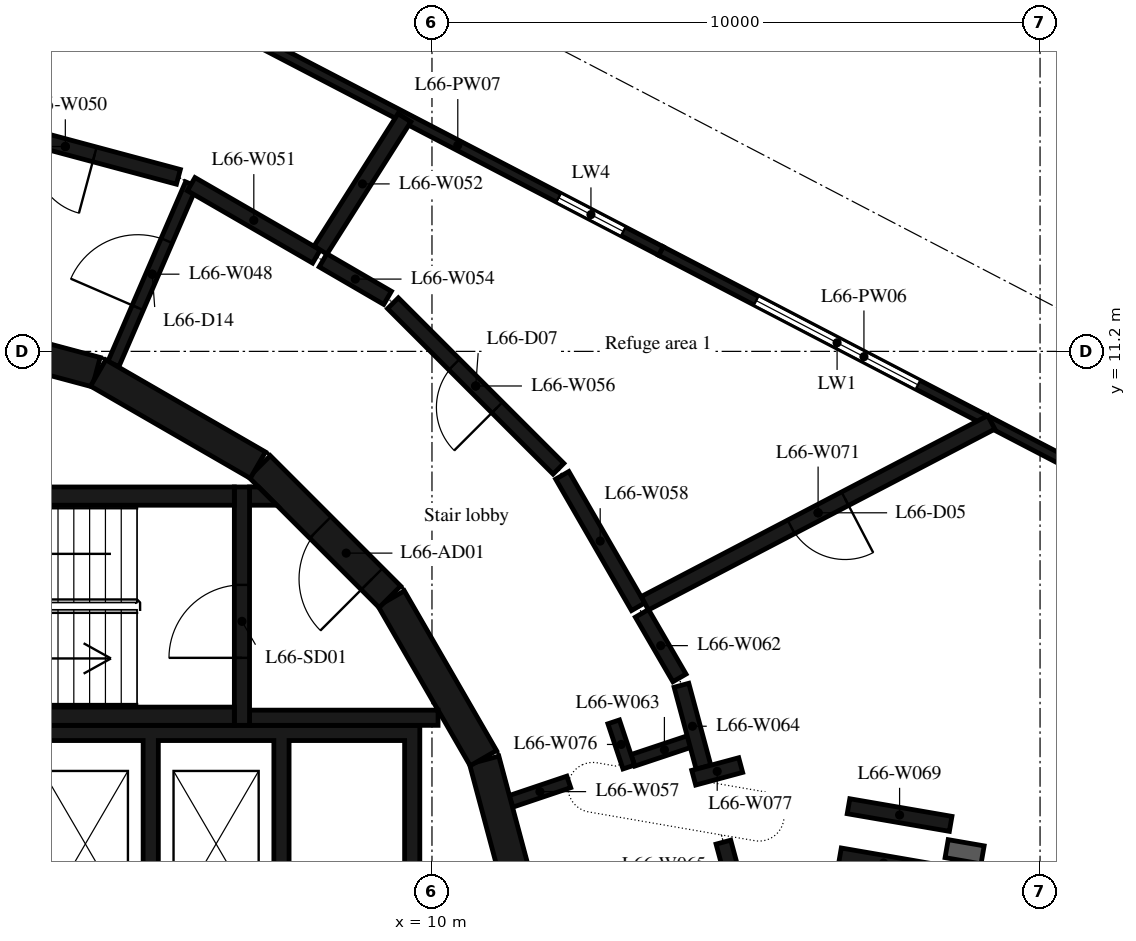
"""IFC4 building model, lengths in metres.
Left out: names, types, materials, properties, quantities, classifications, styles, units other than length and angle.
Written with IfcOpenShell. Run it as: python <this file> out.ifc"""

import sys

from ifc_helpers import new_model, si_unit, direction, frame, frame_2d, origin, place, context, subcontext, project, spatial, polyline, rectangle, outline, extrude, element, fill, save


model = new_model("IFC4")
c1 = context("Model", 3, precision=1e-05, world=origin(), true_north=direction((0.0, 1.0)))
c2 = subcontext(c1, "Body", "Model", "MODEL_VIEW")
j1 = project(units=[si_unit("LENGTHUNIT", "METRE"), si_unit("PLANEANGLEUNIT", "RADIAN")], contexts=[c1])
p1 = place(None, origin())
s1 = spatial("IfcSite", under=j1, at=p1, CompositionType="ELEMENT")
p2 = place(p1, origin())
s2 = spatial("IfcBuilding", under=s1, at=p2, CompositionType="ELEMENT")
p3 = place(p2, frame((0.0, 0.0, 258.2)))
s3 = spatial("IfcBuildingStorey", under=s2, at=p3, CompositionType="ELEMENT", Elevation=258.2)
p4 = place(p3, frame((20.443, 9.374, 0.0), z_axis=(0.0, 0.0, 1.0), x_axis=(-0.88700649569, 0.461756945377, 0.0)))
e1 = element("IfcWall", 1, at=p4, inside=s3, PredefinedType="STANDARD", context=c2, shape_type="SweptSolid", body=[
    extrude(rectangle(XDim=7.53, YDim=0.16, at=frame_2d((3.765, 0.0))), origin(), (0.0, 0.0, 1.0), 4.75),
])
p5 = place(p4, frame((2.763, 0.0, 1.0)))
e2 = element("IfcOpeningElement", 2, at=p5, cuts=e1, PredefinedType="OPENING", context=c2, shape_type="SweptSolid", body=[
    extrude(rectangle(XDim=3.0, YDim=2.2, at=frame_2d((1.5, 1.1))), frame((0.0, 0.09, 0.0), z_axis=(0.0, -1.0, 0.0), x_axis=(1.0, 0.0, 0.0)), (0.0, 0.0, 1.0), 0.18),
])
p6 = place(p3, frame((13.764, 12.851, 0.0), z_axis=(0.0, 0.0, 1.0), x_axis=(-0.887013408436, 0.461743666177, 0.0)))
e3 = element("IfcWall", 3, at=p6, inside=s3, PredefinedType="STANDARD", context=c2, shape_type="SweptSolid", body=[
    extrude(rectangle(XDim=7.53, YDim=0.16, at=frame_2d((3.765, 0.0))), origin(), (0.0, 0.0, 1.0), 4.75),
])
p7 = place(p6, frame((0.696, 0.0, 1.0)))
e4 = element("IfcOpeningElement", 4, at=p7, cuts=e3, PredefinedType="OPENING", context=c2, shape_type="SweptSolid", body=[
    extrude(rectangle(XDim=1.2, YDim=2.2, at=frame_2d((0.6, 1.1))), frame((0.0, 0.09, 0.0), z_axis=(0.0, -1.0, 0.0), x_axis=(1.0, 0.0, 0.0)), (0.0, 0.0, 1.0), 0.18),
])
for number, where, z_axis, x_axis in (
    (5, (11.643, 1.55, 0.0), (0.0, 0.0, 1.0), (-0.259, 0.966, 0.0)),
    (6, (10.845, 4.51, 0.0), (0.0, 0.0, 1.0), (-0.5, 0.866, 0.0)),
):
    element("IfcWall", number, at=place(p3, frame(where, z_axis=z_axis, x_axis=x_axis)), inside=s3, PredefinedType="SHEAR", context=c2, shape_type="SweptSolid", body=[
        extrude(rectangle(XDim=3.033, YDim=0.5, at=frame_2d((1.516, 0.0))), origin(), (0.0, 0.0, 1.0), 4.75),
    ])
p8 = place(p3, frame((9.308, 7.164, 0.0), z_axis=(0.0, 0.0, 1.0), x_axis=(-0.707106781187, 0.707106781187, 0.0)))
e7 = element("IfcWall", 7, at=p8, inside=s3, PredefinedType="SHEAR", context=c2, shape_type="SweptSolid", body=[
    extrude(rectangle(XDim=3.032, YDim=0.5, at=frame_2d((1.516, 0.0))), origin(), (0.0, 0.0, 1.0), 4.75),
])
p9 = place(p8, frame((0.416, 0.0, 0.0)))
e8 = element("IfcOpeningElement", 8, at=p9, cuts=e7, PredefinedType="OPENING", context=c2, shape_type="SweptSolid", body=[
    extrude(rectangle(XDim=1.2, YDim=2.1, at=frame_2d((0.6, 1.05))), frame((0.0, 0.26, 0.0), z_axis=(0.0, -1.0, 0.0), x_axis=(1.0, 0.0, 0.0)), (0.0, 0.0, 1.0), 0.52),
])
p10 = place(p3, frame((7.137, 9.329, 0.0), z_axis=(0.0, 0.0, 1.0), x_axis=(-0.865975092491, 0.500087131594, 0.0)))
e9 = element("IfcWall", 9, at=p10, inside=s3, PredefinedType="SHEAR", context=c2, shape_type="SweptSolid", body=[
    extrude(rectangle(XDim=3.033, YDim=0.5, at=frame_2d((1.516, 0.0))), origin(), (0.0, 0.0, 1.0), 4.75),
])
p11 = place(p3, frame((4.479, 10.858, 0.0), z_axis=(0.0, 0.0, 1.0), x_axis=(-0.965948410781, 0.258734743916, 0.0)))
e10 = element("IfcWall", 10, at=p11, inside=s3, PredefinedType="SHEAR", context=c2, shape_type="SweptSolid", body=[
    extrude(rectangle(XDim=3.033, YDim=0.5, at=frame_2d((1.516, 0.0))), origin(), (0.0, 0.0, 1.0), 4.75),
])
p12 = place(p11, frame((1.016, 0.0, 0.0)))
e11 = element("IfcOpeningElement", 11, at=p12, cuts=e10, PredefinedType="OPENING", context=c2, shape_type="SweptSolid", body=[
    extrude(rectangle(XDim=1.0, YDim=2.4, at=frame_2d((0.5, 1.2))), frame((0.0, 0.26, 0.0), z_axis=(0.0, -1.0, 0.0), x_axis=(1.0, 0.0, 0.0)), (0.0, 0.0, 1.0), 0.52),
])
for number, where, z_axis, x_axis in (
    (12, (0.0, 5.2, 0.0), (0.0, 0.0, 1.0), (1.0, 0.0, 0.0)),
    (13, (0.0, 8.82, 0.0), (0.0, 0.0, 1.0), (1.0, 0.0, 0.0)),
):
    element("IfcWall", number, at=place(p3, frame(where, z_axis=z_axis, x_axis=x_axis)), inside=s3, PredefinedType="SHEAR", context=c2, shape_type="SweptSolid", body=[
        extrude(rectangle(XDim=6.75, YDim=0.3, at=frame_2d((3.375, 0.0))), origin(), (0.0, 0.0, 1.0), 4.75),
    ])
p13 = place(p3, frame((6.875, 5.05, 0.0), z_axis=(0.0, 0.0, 1.0), x_axis=(0.0, 1.0, 0.0)))
e14 = element("IfcWall", 14, at=p13, inside=s3, PredefinedType="SHEAR", context=c2, shape_type="SweptSolid", body=[
    extrude(rectangle(XDim=3.92, YDim=0.25, at=frame_2d((1.96, 0.0))), origin(), (0.0, 0.0, 1.0), 4.75),
])
p14 = place(p13, frame((1.11, 0.0, 0.0)))
e15 = element("IfcOpeningElement", 15, at=p14, cuts=e14, PredefinedType="OPENING", context=c2, shape_type="SweptSolid", body=[
    extrude(rectangle(XDim=1.2, YDim=2.1, at=frame_2d((0.6, 1.05))), frame((0.0, 0.135, 0.0), z_axis=(0.0, -1.0, 0.0), x_axis=(1.0, 0.0, 0.0)), (0.0, 0.0, 1.0), 0.27),
])
p15 = place(p3, frame((7.0, 5.175, 0.0), z_axis=(0.0, 0.0, 1.0), x_axis=(1.0, 0.0, 0.0)))
e16 = element("IfcWall", 16, at=p15, inside=s3, PredefinedType="SHEAR", context=c2, shape_type="SweptSolid", body=[
    extrude(rectangle(XDim=3.1, YDim=0.25, at=frame_2d((1.55, 0.0))), origin(), (0.0, 0.0, 1.0), 4.75),
])
p16 = place(p3, origin())
e17 = element("IfcWall", 17, at=p16, inside=s3, PredefinedType="SHEAR", context=c2, shape_type="SweptSolid", body=[
    extrude(outline(polyline([(7.448, 8.67), (7.0, 8.67), (7.0, 8.97), (7.148, 8.97), (7.448, 8.67)])), origin(), (0.0, 0.0, 1.0), 4.75),
])
p17 = place(p3, origin())
e18 = element("IfcWall", 18, at=p17, inside=s3, PredefinedType="SHEAR", context=c2, shape_type="SweptSolid", body=[
    extrude(outline(polyline([(-9.55, 4.8), (-5.5, 4.8), (-5.5, 1.9), (-5.25, 1.9), (-5.25, 4.8), (-1.2, 4.8), (-1.2, 1.9), (-0.95, 1.9), (-0.95, 4.8), (0.95, 4.8), (0.95, 1.9), (1.2, 1.9), (1.2, 4.8), (3.1, 4.8), (3.1, 1.9), (3.35, 1.9), (3.35, 4.8), (5.25, 4.8), (5.25, 1.9), (5.5, 1.9), (5.5, 4.8), (7.4, 4.8), (7.4, 1.9), (7.65, 1.9), (7.65, 4.8), (9.55, 4.8), (9.55, 1.9), (9.8, 1.9), (9.8, 4.8), (9.8, 5.05), (-9.8, 5.05), (-9.8, 4.8), (-9.8, 1.9), (-9.55, 1.9), (-9.55, 4.8)])), origin(), (0.0, 0.0, 1.0), 4.75),
])
p18 = place(p3, frame((4.76, 10.99, 0.0), z_axis=(0.0, 0.0, 1.0), x_axis=(0.396905977672, 0.917859272922, 0.0)))
e19 = element("IfcWall", 19, at=p18, inside=s3, PredefinedType="PARTITIONING", context=c2, shape_type="SweptSolid", body=[
    extrude(rectangle(XDim=3.224, YDim=0.2, at=frame_2d((1.612, 0.0))), origin(), (0.0, 0.0, 1.0), 4.75),
])
p19 = place(p18, frame((1.012, 0.0, 0.0)))
e20 = element("IfcOpeningElement", 20, at=p19, cuts=e19, PredefinedType="OPENING", context=c2, shape_type="SweptSolid", body=[
    extrude(rectangle(XDim=1.2, YDim=2.1, at=frame_2d((0.6, 1.05))), frame((0.0, 0.11, 0.0), z_axis=(0.0, -1.0, 0.0), x_axis=(1.0, 0.0, 0.0)), (0.0, 0.0, 1.0), 0.22),
])
p20 = place(p3, frame((5.83, 14.07, 0.0), z_axis=(0.0, 0.0, 1.0), x_axis=(-0.965861411942, 0.259059323171, 0.0)))
e21 = element("IfcWall", 21, at=p20, inside=s3, PredefinedType="PARTITIONING", context=c2, shape_type="SweptSolid", body=[
    extrude(rectangle(XDim=3.851, YDim=0.25, at=frame_2d((1.925, 0.0))), origin(), (0.0, 0.0, 1.0), 4.75),
])
p21 = place(p20, frame((1.425, 0.0, 0.0)))
e22 = element("IfcOpeningElement", 22, at=p21, cuts=e21, PredefinedType="OPENING", context=c2, shape_type="SweptSolid", body=[
    extrude(rectangle(XDim=1.0, YDim=2.1, at=frame_2d((0.5, 1.05))), frame((0.0, 0.135, 0.0), z_axis=(0.0, -1.0, 0.0), x_axis=(1.0, 0.0, 0.0)), (0.0, 0.0, 1.0), 0.27),
])
p22 = place(p3, frame((6.04, 13.95, 0.0), z_axis=(0.0, 0.0, 1.0), x_axis=(0.865922362496, -0.500178430292, 0.0)))
e23 = element("IfcWall", 23, at=p22, inside=s3, PredefinedType="PARTITIONING", context=c2, shape_type="SweptSolid", body=[
    extrude(rectangle(XDim=2.379, YDim=0.25, at=frame_2d((1.189, 0.0))), origin(), (0.0, 0.0, 1.0), 4.75),
])
p23 = place(p3, frame((8.167, 12.865, 0.0), z_axis=(0.0, 0.0, 1.0), x_axis=(0.535428337452, 0.844580662491, 0.0)))
e24 = element("IfcWall", 24, at=p23, inside=s3, PredefinedType="PARTITIONING", context=c2, shape_type="SweptSolid", body=[
    extrude(rectangle(XDim=2.578, YDim=0.25, at=frame_2d((1.289, 0.0))), origin(), (0.0, 0.0, 1.0), 4.75),
])
p24 = place(p3, frame((9.27, 12.08, 0.0), z_axis=(0.0, 0.0, 1.0), x_axis=(-0.864599561852, 0.502461538474, 0.0)))
e25 = element("IfcWall", 25, at=p24, inside=s3, PredefinedType="PARTITIONING", context=c2, shape_type="SweptSolid", body=[
    extrude(rectangle(XDim=1.228, YDim=0.25, at=frame_2d((0.614, 0.0))), origin(), (0.0, 0.0, 1.0), 4.75),
])
p25 = place(p3, frame((12.08, 9.27, 0.0), z_axis=(0.0, 0.0, 1.0), x_axis=(-0.707106781187, 0.707106781187, 0.0)))
e26 = element("IfcWall", 26, at=p25, inside=s3, PredefinedType="PARTITIONING", context=c2, shape_type="SweptSolid", body=[
    extrude(rectangle(XDim=3.849, YDim=0.25, at=frame_2d((1.925, 0.0))), origin(), (0.0, 0.0, 1.0), 4.75),
])
p26 = place(p25, frame((1.425, 0.0, 0.0)))
e27 = element("IfcOpeningElement", 27, at=p26, cuts=e26, PredefinedType="OPENING", context=c2, shape_type="SweptSolid", body=[
    extrude(rectangle(XDim=1.0, YDim=2.1, at=frame_2d((0.5, 1.05))), frame((0.0, 0.135, 0.0), z_axis=(0.0, -1.0, 0.0), x_axis=(1.0, 0.0, 0.0)), (0.0, 0.0, 1.0), 0.27),
])
p27 = place(p3, frame((12.25, 4.12, 0.0), z_axis=(0.0, 0.0, 1.0), x_axis=(-0.947655422203, -0.319294849269, 0.0)))
e28 = element("IfcWall", 28, at=p27, inside=s3, PredefinedType="PARTITIONING", context=c2, shape_type="SweptSolid", body=[
    extrude(rectangle(XDim=1.002, YDim=0.2, at=frame_2d((0.501, 0.0))), origin(), (0.0, 0.0, 1.0), 4.75),
])
p28 = place(p3, frame((13.39, 7.0, 0.0), z_axis=(0.0, 0.0, 1.0), x_axis=(-0.499790202325, 0.86614649665, 0.0)))
e29 = element("IfcWall", 29, at=p28, inside=s3, PredefinedType="PARTITIONING", context=c2, shape_type="SweptSolid", body=[
    extrude(rectangle(XDim=2.496, YDim=0.25, at=frame_2d((1.248, 0.0))), origin(), (0.0, 0.0, 1.0), 4.75),
])
p29 = place(p3, frame((14.07, 5.83, 0.0), z_axis=(0.0, 0.0, 1.0), x_axis=(-0.502547897079, 0.864549368828, 0.0)))
e30 = element("IfcWall", 30, at=p29, inside=s3, PredefinedType="PARTITIONING", context=c2, shape_type="SweptSolid", body=[
    extrude(rectangle(XDim=1.228, YDim=0.25, at=frame_2d((0.614, 0.0))), origin(), (0.0, 0.0, 1.0), 4.75),
])
p30 = place(p3, frame((14.34, 4.82, 0.0), z_axis=(0.0, 0.0, 1.0), x_axis=(-0.948660926874, -0.316294871634, 0.0)))
e31 = element("IfcWall", 31, at=p30, inside=s3, PredefinedType="PARTITIONING", context=c2, shape_type="SweptSolid", body=[
    extrude(rectangle(XDim=1.092, YDim=0.2, at=frame_2d((0.546, 0.0))), origin(), (0.0, 0.0, 1.0), 4.75),
])
p31 = place(p3, frame((14.465, 4.361, 0.0), z_axis=(0.0, 0.0, 1.0), x_axis=(-0.259741378437, 0.965678215726, 0.0)))
e32 = element("IfcWall", 32, at=p31, inside=s3, PredefinedType="PARTITIONING", context=c2, shape_type="SweptSolid", body=[
    extrude(rectangle(XDim=1.396, YDim=0.25, at=frame_2d((0.698, 0.0))), origin(), (0.0, 0.0, 1.0), 4.75),
])
p32 = place(p3, frame((15.0, 2.36, 0.0), z_axis=(0.0, 0.0, 1.0), x_axis=(-0.260445943037, 0.965488431187, 0.0)))
e33 = element("IfcWall", 33, at=p32, inside=s3, PredefinedType="PARTITIONING", context=c2, shape_type="SweptSolid", body=[
    extrude(rectangle(XDim=0.797, YDim=0.25, at=frame_2d((0.398, 0.0))), origin(), (0.0, 0.0, 1.0), 4.75),
])
p33 = place(p3, frame((16.71, 2.91, 0.0), z_axis=(0.0, 0.0, 1.0), x_axis=(0.985443639096, -0.170002453407, 0.0)))
e34 = element("IfcWall", 34, at=p33, inside=s3, PredefinedType="PARTITIONING", context=c2, shape_type="SweptSolid", body=[
    extrude(rectangle(XDim=1.455, YDim=0.25, at=frame_2d((0.728, 0.0))), origin(), (0.0, 0.0, 1.0), 4.75),
])
p34 = place(p3, frame((18.53, 3.43, 0.0), z_axis=(0.0, 0.0, 1.0), x_axis=(-0.985421228399, 0.170132309161, 0.0)))
e35 = element("IfcWall", 35, at=p34, inside=s3, PredefinedType="PARTITIONING", context=c2, shape_type="SweptSolid", body=[
    extrude(rectangle(XDim=1.705, YDim=0.25, at=frame_2d((0.853, 0.0))), origin(), (0.0, 0.0, 1.0), 4.75),
])
p35 = place(p3, frame((19.199, 10.033, 0.0), z_axis=(0.0, 0.0, 1.0), x_axis=(-0.886450722397, -0.462822986424, 0.0)))
e36 = element("IfcWall", 36, at=p35, inside=s3, PredefinedType="PARTITIONING", context=c2, shape_type="SweptSolid", body=[
    extrude(rectangle(XDim=6.428, YDim=0.25, at=frame_2d((3.214, 0.0))), origin(), (0.0, 0.0, 1.0), 4.75),
])
p36 = place(p35, frame((2.714, 0.0, 0.0)))
e37 = element("IfcOpeningElement", 37, at=p36, cuts=e36, PredefinedType="OPENING", context=c2, shape_type="SweptSolid", body=[
    extrude(rectangle(XDim=1.0, YDim=2.1, at=frame_2d((0.5, 1.05))), frame((0.0, 0.135, 0.0), z_axis=(0.0, -1.0, 0.0), x_axis=(1.0, 0.0, 0.0)), (0.0, 0.0, 1.0), 0.27),
])
p37 = place(p3, frame((12.988, 5.107, 0.0), z_axis=(0.0, 0.0, 1.0), x_axis=(0.316414803104, -0.948620931867, 0.0)))
e38 = element("IfcWall", 38, at=p37, inside=s3, PredefinedType="PARTITIONING", context=c2, shape_type="SweptSolid", body=[
    extrude(rectangle(XDim=0.783, YDim=0.2, at=frame_2d((0.392, 0.0))), origin(), (0.0, 0.0, 1.0), 4.75),
])
p38 = place(p3, frame((14.304, 4.189, 0.0), z_axis=(0.0, 0.0, 1.0), x_axis=(0.965680559049, 0.259732666167, 0.0)))
e39 = element("IfcWall", 39, at=p38, inside=s3, PredefinedType="PARTITIONING", context=c2, shape_type="SweptSolid", body=[
    extrude(rectangle(XDim=0.8, YDim=0.25, at=frame_2d((0.4, 0.0))), origin(), (0.0, 0.0, 1.0), 4.75),
])
p39 = place(p5, origin())
e40 = element("IfcWindow", 40, at=p39, inside=s3, PartitioningType="SINGLE_PANEL", PredefinedType="WINDOW", context=c2, shape_type="SweptSolid", body=[
    extrude(rectangle(XDim=3.0, YDim=2.2, at=frame_2d((1.5, 1.1))), frame((0.0, 0.03, 0.0), z_axis=(0.0, -1.0, 0.0), x_axis=(1.0, 0.0, 0.0)), (0.0, 0.0, 1.0), 0.06),
])
fill(e2, e40)
p40 = place(p7, origin())
e41 = element("IfcWindow", 41, at=p40, inside=s3, PartitioningType="SINGLE_PANEL", PredefinedType="WINDOW", context=c2, shape_type="SweptSolid", body=[
    extrude(rectangle(XDim=1.2, YDim=2.2, at=frame_2d((0.6, 1.1))), frame((0.0, 0.03, 0.0), z_axis=(0.0, -1.0, 0.0), x_axis=(1.0, 0.0, 0.0)), (0.0, 0.0, 1.0), 0.06),
])
fill(e4, e41)
p41 = place(p14, origin())
e42 = element("IfcDoor", 42, at=p41, inside=s3, OperationType="SINGLE_SWING_LEFT", PredefinedType="DOOR", context=c2, shape_type="SweptSolid", body=[
    extrude(rectangle(XDim=1.2, YDim=2.1, at=frame_2d((0.6, 1.05))), frame((0.0, 0.025, 0.0), z_axis=(0.0, -1.0, 0.0), x_axis=(1.0, 0.0, 0.0)), (0.0, 0.0, 1.0), 0.05),
])
fill(e15, e42)
p42 = place(p9, origin())
e43 = element("IfcDoor", 43, at=p42, inside=s3, OperationType="SINGLE_SWING_RIGHT", PredefinedType="DOOR", context=c2, shape_type="SweptSolid", body=[
    extrude(rectangle(XDim=1.2, YDim=2.1, at=frame_2d((0.6, 1.05))), frame((0.0, 0.025, 0.0), z_axis=(0.0, -1.0, 0.0), x_axis=(1.0, 0.0, 0.0)), (0.0, 0.0, 1.0), 0.05),
])
fill(e8, e43)
p43 = place(p36, origin())
e44 = element("IfcDoor", 44, at=p43, inside=s3, OperationType="SINGLE_SWING_LEFT", PredefinedType="DOOR", context=c2, shape_type="SweptSolid", body=[
    extrude(rectangle(XDim=1.0, YDim=2.1, at=frame_2d((0.5, 1.05))), frame((0.0, 0.025, 0.0), z_axis=(0.0, -1.0, 0.0), x_axis=(1.0, 0.0, 0.0)), (0.0, 0.0, 1.0), 0.05),
])
fill(e37, e44)
p44 = place(p26, origin())
e45 = element("IfcDoor", 45, at=p44, inside=s3, OperationType="SINGLE_SWING_LEFT", PredefinedType="DOOR", context=c2, shape_type="SweptSolid", body=[
    extrude(rectangle(XDim=1.0, YDim=2.1, at=frame_2d((0.5, 1.05))), frame((0.0, 0.025, 0.0), z_axis=(0.0, -1.0, 0.0), x_axis=(1.0, 0.0, 0.0)), (0.0, 0.0, 1.0), 0.05),
])
fill(e27, e45)
p45 = place(p21, origin())
e46 = element("IfcDoor", 46, at=p45, inside=s3, OperationType="SINGLE_SWING_LEFT", PredefinedType="DOOR", context=c2, shape_type="SweptSolid", body=[
    extrude(rectangle(XDim=1.0, YDim=2.1, at=frame_2d((0.5, 1.05))), frame((0.0, 0.025, 0.0), z_axis=(0.0, -1.0, 0.0), x_axis=(1.0, 0.0, 0.0)), (0.0, 0.0, 1.0), 0.05),
])
fill(e22, e46)
p46 = place(p19, origin())
e47 = element("IfcDoor", 47, at=p46, inside=s3, OperationType="SINGLE_SWING_LEFT", PredefinedType="DOOR", context=c2, shape_type="SweptSolid", body=[
    extrude(rectangle(XDim=1.2, YDim=2.1, at=frame_2d((0.6, 1.05))), frame((0.0, 0.025, 0.0), z_axis=(0.0, -1.0, 0.0), x_axis=(1.0, 0.0, 0.0)), (0.0, 0.0, 1.0), 0.05),
])
fill(e20, e47)
save(model, sys.argv[1])
